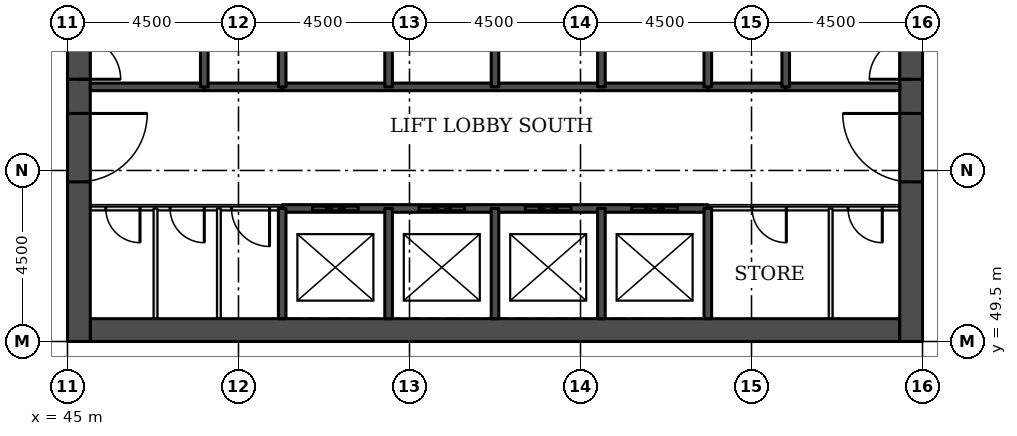
"""IFC4 building model, lengths in metres.
Left out: names, types, materials, properties, quantities, classifications, styles, units other than length and angle.
Written with IfcOpenShell. Run it as: python <this file> out.ifc"""

import sys

from ifc_helpers import new_model, si_unit, direction, frame, frame_2d, origin, place, context, subcontext, project, spatial, rectangle, extrude, element, fill, save


model = new_model("IFC4")
c1 = context("Model", 3, precision=1e-05, world=origin(), true_north=direction((0.0, 1.0)))
c2 = subcontext(c1, "Body", "Model", "MODEL_VIEW")
j1 = project(units=[si_unit("LENGTHUNIT", "METRE"), si_unit("PLANEANGLEUNIT", "RADIAN")], contexts=[c1])
p1 = place(None, origin())
s1 = spatial("IfcSite", under=j1, at=p1, CompositionType="ELEMENT")
p2 = place(p1, origin())
s2 = spatial("IfcBuilding", under=s1, at=p2, CompositionType="ELEMENT")
p3 = place(p2, frame((0.0, 0.0, 13.5)))
s3 = spatial("IfcBuildingStorey", under=s2, at=p3, CompositionType="ELEMENT", Elevation=13.5)
p4 = place(p3, frame((45.6, 49.8, 0.0), z_axis=(0.0, 0.0, 1.0), x_axis=(1.0, 0.0, 0.0)))
e1 = element("IfcWall", 1, at=p4, inside=s3, PredefinedType="SHEAR", context=c2, shape_type="SweptSolid", body=[
    extrude(rectangle(XDim=21.3, YDim=0.6, at=frame_2d((10.65, 0.0))), origin(), (0.0, 0.0, 1.0), 5.0),
])
p5 = place(p3, frame((45.3, 49.5, 0.0), z_axis=(0.0, 0.0, 1.0), x_axis=(0.0, 1.0, 0.0)))
e2 = element("IfcWall", 2, at=p5, inside=s3, PredefinedType="SHEAR", context=c2, shape_type="SweptSolid", body=[
    extrude(rectangle(XDim=22.5, YDim=0.6, at=frame_2d((11.25, 0.0))), origin(), (0.0, 0.0, 1.0), 5.0),
])
p6 = place(p5, frame((4.2, 0.0, 0.0)))
e3 = element("IfcOpeningElement", 3, at=p6, cuts=e2, PredefinedType="OPENING", context=c2, shape_type="SweptSolid", body=[
    extrude(rectangle(XDim=1.8, YDim=2.1, at=frame_2d((0.9, 1.05))), frame((0.0, 0.31, 0.0), z_axis=(0.0, -1.0, 0.0), x_axis=(1.0, 0.0, 0.0)), (0.0, 0.0, 1.0), 0.62),
])
p7 = place(p5, frame((6.9, 0.0, 0.0)))
e4 = element("IfcOpeningElement", 4, at=p7, cuts=e2, PredefinedType="OPENING", context=c2, shape_type="SweptSolid", body=[
    extrude(rectangle(XDim=1.1, YDim=2.1, at=frame_2d((0.55, 1.05))), frame((0.0, 0.31, 0.0), z_axis=(0.0, -1.0, 0.0), x_axis=(1.0, 0.0, 0.0)), (0.0, 0.0, 1.0), 0.62),
])
p8 = place(p5, frame((13.6, 0.0, 0.0)))
e5 = element("IfcOpeningElement", 5, at=p8, cuts=e2, PredefinedType="OPENING", context=c2, shape_type="SweptSolid", body=[
    extrude(rectangle(XDim=1.1, YDim=2.1, at=frame_2d((0.55, 1.05))), frame((0.0, 0.31, 0.0), z_axis=(0.0, -1.0, 0.0), x_axis=(1.0, 0.0, 0.0)), (0.0, 0.0, 1.0), 0.62),
])
p9 = place(p5, frame((16.5, 0.0, 0.0)))
e6 = element("IfcOpeningElement", 6, at=p9, cuts=e2, PredefinedType="OPENING", context=c2, shape_type="SweptSolid", body=[
    extrude(rectangle(XDim=1.8, YDim=2.1, at=frame_2d((0.9, 1.05))), frame((0.0, 0.31, 0.0), z_axis=(0.0, -1.0, 0.0), x_axis=(1.0, 0.0, 0.0)), (0.0, 0.0, 1.0), 0.62),
])
p10 = place(p3, frame((67.2, 49.5, 0.0), z_axis=(0.0, 0.0, 1.0), x_axis=(0.0, 1.0, 0.0)))
e7 = element("IfcWall", 7, at=p10, inside=s3, PredefinedType="SHEAR", context=c2, shape_type="SweptSolid", body=[
    extrude(rectangle(XDim=22.5, YDim=0.6, at=frame_2d((11.25, 0.0))), origin(), (0.0, 0.0, 1.0), 5.0),
])
p11 = place(p10, frame((4.2, 0.0, 0.0)))
e8 = element("IfcOpeningElement", 8, at=p11, cuts=e7, PredefinedType="OPENING", context=c2, shape_type="SweptSolid", body=[
    extrude(rectangle(XDim=1.8, YDim=2.1, at=frame_2d((0.9, 1.05))), frame((0.0, 0.31, 0.0), z_axis=(0.0, -1.0, 0.0), x_axis=(1.0, 0.0, 0.0)), (0.0, 0.0, 1.0), 0.62),
])
p12 = place(p10, frame((6.9, 0.0, 0.0)))
e9 = element("IfcOpeningElement", 9, at=p12, cuts=e7, PredefinedType="OPENING", context=c2, shape_type="SweptSolid", body=[
    extrude(rectangle(XDim=1.1, YDim=2.1, at=frame_2d((0.55, 1.05))), frame((0.0, 0.31, 0.0), z_axis=(0.0, -1.0, 0.0), x_axis=(1.0, 0.0, 0.0)), (0.0, 0.0, 1.0), 0.62),
])
p13 = place(p10, frame((13.6, 0.0, 0.0)))
e10 = element("IfcOpeningElement", 10, at=p13, cuts=e7, PredefinedType="OPENING", context=c2, shape_type="SweptSolid", body=[
    extrude(rectangle(XDim=1.1, YDim=2.1, at=frame_2d((0.55, 1.05))), frame((0.0, 0.31, 0.0), z_axis=(0.0, -1.0, 0.0), x_axis=(1.0, 0.0, 0.0)), (0.0, 0.0, 1.0), 0.62),
])
p14 = place(p10, frame((16.5, 0.0, 0.0)))
e11 = element("IfcOpeningElement", 11, at=p14, cuts=e7, PredefinedType="OPENING", context=c2, shape_type="SweptSolid", body=[
    extrude(rectangle(XDim=1.8, YDim=2.1, at=frame_2d((0.9, 1.05))), frame((0.0, 0.31, 0.0), z_axis=(0.0, -1.0, 0.0), x_axis=(1.0, 0.0, 0.0)), (0.0, 0.0, 1.0), 0.62),
])
p15 = place(p3, frame((45.6, 53.0, 0.0), z_axis=(0.0, 0.0, 1.0), x_axis=(1.0, 0.0, 0.0)))
e12 = element("IfcWall", 12, at=p15, inside=s3, PredefinedType="PARTITIONING", context=c2, shape_type="SweptSolid", body=[
    extrude(rectangle(XDim=5.05, YDim=0.1, at=frame_2d((2.525, 0.0))), origin(), (0.0, 0.0, 1.0), 4.78),
])
p16 = place(p15, frame((0.408, 0.0, 0.0)))
e13 = element("IfcOpeningElement", 13, at=p16, cuts=e12, PredefinedType="OPENING", context=c2, shape_type="SweptSolid", body=[
    extrude(rectangle(XDim=0.9, YDim=2.1, at=frame_2d((0.45, 1.05))), frame((0.0, 0.06, 0.0), z_axis=(0.0, -1.0, 0.0), x_axis=(1.0, 0.0, 0.0)), (0.0, 0.0, 1.0), 0.12),
])
p17 = place(p15, frame((2.1, 0.0, 0.0)))
e14 = element("IfcOpeningElement", 14, at=p17, cuts=e12, PredefinedType="OPENING", context=c2, shape_type="SweptSolid", body=[
    extrude(rectangle(XDim=0.9, YDim=2.1, at=frame_2d((0.45, 1.05))), frame((0.0, 0.06, 0.0), z_axis=(0.0, -1.0, 0.0), x_axis=(1.0, 0.0, 0.0)), (0.0, 0.0, 1.0), 0.12),
])
p18 = place(p15, frame((3.717, 0.0, 0.0)))
e15 = element("IfcOpeningElement", 15, at=p18, cuts=e12, PredefinedType="OPENING", context=c2, shape_type="SweptSolid", body=[
    extrude(rectangle(XDim=1.0, YDim=2.1, at=frame_2d((0.5, 1.05))), frame((0.0, 0.06, 0.0), z_axis=(0.0, -1.0, 0.0), x_axis=(1.0, 0.0, 0.0)), (0.0, 0.0, 1.0), 0.12),
])
p19 = place(p3, frame((61.85, 53.0, 0.0), z_axis=(0.0, 0.0, 1.0), x_axis=(1.0, 0.0, 0.0)))
e16 = element("IfcWall", 16, at=p19, inside=s3, PredefinedType="PARTITIONING", context=c2, shape_type="SweptSolid", body=[
    extrude(rectangle(XDim=5.05, YDim=0.1, at=frame_2d((2.525, 0.0))), origin(), (0.0, 0.0, 1.0), 4.78),
])
p20 = place(p19, frame((3.691, 0.0, 0.0)))
e17 = element("IfcOpeningElement", 17, at=p20, cuts=e16, PredefinedType="OPENING", context=c2, shape_type="SweptSolid", body=[
    extrude(rectangle(XDim=0.9, YDim=2.1, at=frame_2d((0.45, 1.05))), frame((0.0, 0.06, 0.0), z_axis=(0.0, -1.0, 0.0), x_axis=(1.0, 0.0, 0.0)), (0.0, 0.0, 1.0), 0.12),
])
p21 = place(p19, frame((1.166, 0.0, 0.0)))
e18 = element("IfcOpeningElement", 18, at=p21, cuts=e16, PredefinedType="OPENING", context=c2, shape_type="SweptSolid", body=[
    extrude(rectangle(XDim=0.9, YDim=2.1, at=frame_2d((0.45, 1.05))), frame((0.0, 0.06, 0.0), z_axis=(0.0, -1.0, 0.0), x_axis=(1.0, 0.0, 0.0)), (0.0, 0.0, 1.0), 0.12),
])
p22 = place(p3, frame((50.65, 53.0, 0.0), z_axis=(0.0, 0.0, 1.0), x_axis=(1.0, 0.0, 0.0)))
e19 = element("IfcWall", 19, at=p22, inside=s3, PredefinedType="SOLIDWALL", context=c2, shape_type="SweptSolid", body=[
    extrude(rectangle(XDim=11.2, YDim=0.2, at=frame_2d((5.6, 0.0))), origin(), (0.0, 0.0, 1.0), 4.78),
])
p23 = place(p22, frame((0.8, 0.0, 0.0)))
e20 = element("IfcOpeningElement", 20, at=p23, cuts=e19, PredefinedType="OPENING", context=c2, shape_type="SweptSolid", body=[
    extrude(rectangle(XDim=1.2, YDim=2.1, at=frame_2d((0.6, 1.05))), frame((0.0, 0.11, 0.0), z_axis=(0.0, -1.0, 0.0), x_axis=(1.0, 0.0, 0.0)), (0.0, 0.0, 1.0), 0.22),
])
p24 = place(p22, frame((3.6, 0.0, 0.0)))
e21 = element("IfcOpeningElement", 21, at=p24, cuts=e19, PredefinedType="OPENING", context=c2, shape_type="SweptSolid", body=[
    extrude(rectangle(XDim=1.2, YDim=2.1, at=frame_2d((0.6, 1.05))), frame((0.0, 0.11, 0.0), z_axis=(0.0, -1.0, 0.0), x_axis=(1.0, 0.0, 0.0)), (0.0, 0.0, 1.0), 0.22),
])
p25 = place(p22, frame((6.4, 0.0, 0.0)))
e22 = element("IfcOpeningElement", 22, at=p25, cuts=e19, PredefinedType="OPENING", context=c2, shape_type="SweptSolid", body=[
    extrude(rectangle(XDim=1.2, YDim=2.1, at=frame_2d((0.6, 1.05))), frame((0.0, 0.11, 0.0), z_axis=(0.0, -1.0, 0.0), x_axis=(1.0, 0.0, 0.0)), (0.0, 0.0, 1.0), 0.22),
])
p26 = place(p22, frame((9.2, 0.0, 0.0)))
e23 = element("IfcOpeningElement", 23, at=p26, cuts=e19, PredefinedType="OPENING", context=c2, shape_type="SweptSolid", body=[
    extrude(rectangle(XDim=1.2, YDim=2.1, at=frame_2d((0.6, 1.05))), frame((0.0, 0.11, 0.0), z_axis=(0.0, -1.0, 0.0), x_axis=(1.0, 0.0, 0.0)), (0.0, 0.0, 1.0), 0.22),
])
for number, where, z_axis, x_axis in (
    (24, (48.6, 56.2, 0.0), (0.0, 0.0, 1.0), (1.0, 0.0, 0.0)),
    (25, (61.85, 56.2, 0.0), (0.0, 0.0, 1.0), (1.0, 0.0, 0.0)),
):
    element("IfcWall", number, at=place(p3, frame(where, z_axis=z_axis, x_axis=x_axis)), inside=s3, PredefinedType="SOLIDWALL", context=c2, shape_type="SweptSolid", body=[
        extrude(rectangle(XDim=2.05, YDim=0.2, at=frame_2d((1.025, 0.0))), origin(), (0.0, 0.0, 1.0), 4.78),
    ])
p27 = place(p3, frame((45.6, 56.2, 0.0), z_axis=(0.0, 0.0, 1.0), x_axis=(1.0, 0.0, 0.0)))
e26 = element("IfcWall", 26, at=p27, inside=s3, PredefinedType="SOLIDWALL", context=c2, shape_type="SweptSolid", body=[
    extrude(rectangle(XDim=3.0, YDim=0.2, at=frame_2d((1.5, 0.0))), origin(), (0.0, 0.0, 1.0), 4.78),
])
p28 = place(p3, frame((50.65, 56.2, 0.0), z_axis=(0.0, 0.0, 1.0), x_axis=(1.0, 0.0, 0.0)))
e27 = element("IfcWall", 27, at=p28, inside=s3, PredefinedType="SOLIDWALL", context=c2, shape_type="SweptSolid", body=[
    extrude(rectangle(XDim=11.2, YDim=0.2, at=frame_2d((5.6, 0.0))), origin(), (0.0, 0.0, 1.0), 4.78),
])
p29 = place(p3, frame((63.9, 56.2, 0.0), z_axis=(0.0, 0.0, 1.0), x_axis=(1.0, 0.0, 0.0)))
e28 = element("IfcWall", 28, at=p29, inside=s3, PredefinedType="SOLIDWALL", context=c2, shape_type="SweptSolid", body=[
    extrude(rectangle(XDim=3.0, YDim=0.2, at=frame_2d((1.5, 0.0))), origin(), (0.0, 0.0, 1.0), 4.78),
])
p30 = place(p3, frame((47.317, 50.1, 0.0), z_axis=(0.0, 0.0, 1.0), x_axis=(0.0, 1.0, 0.0)))
e29 = element("IfcWall", 29, at=p30, inside=s3, PredefinedType="PARTITIONING", context=c2, shape_type="SweptSolid", body=[
    extrude(rectangle(XDim=2.9, YDim=0.1, at=frame_2d((1.45, 0.0))), origin(), (0.0, 0.0, 1.0), 4.78),
])
p31 = place(p3, frame((48.6, 56.2, 0.0), z_axis=(0.0, 0.0, 1.0), x_axis=(0.0, 1.0, 0.0)))
e30 = element("IfcWall", 30, at=p31, inside=s3, PredefinedType="SOLIDWALL", context=c2, shape_type="SweptSolid", body=[
    extrude(rectangle(XDim=5.8, YDim=0.2, at=frame_2d((2.9, 0.0))), origin(), (0.0, 0.0, 1.0), 4.78),
])
p32 = place(p3, frame((48.983, 50.1, 0.0), z_axis=(0.0, 0.0, 1.0), x_axis=(0.0, 1.0, 0.0)))
e31 = element("IfcWall", 31, at=p32, inside=s3, PredefinedType="PARTITIONING", context=c2, shape_type="SweptSolid", body=[
    extrude(rectangle(XDim=2.9, YDim=0.1, at=frame_2d((1.45, 0.0))), origin(), (0.0, 0.0, 1.0), 4.78),
])
p33 = place(p3, frame((50.65, 50.1, 0.0), z_axis=(0.0, 0.0, 1.0), x_axis=(0.0, 1.0, 0.0)))
e32 = element("IfcWall", 32, at=p33, inside=s3, PredefinedType="SOLIDWALL", context=c2, shape_type="SweptSolid", body=[
    extrude(rectangle(XDim=2.9, YDim=0.2, at=frame_2d((1.45, 0.0))), origin(), (0.0, 0.0, 1.0), 4.78),
])
p34 = place(p3, frame((50.65, 56.2, 0.0), z_axis=(0.0, 0.0, 1.0), x_axis=(0.0, 1.0, 0.0)))
e33 = element("IfcWall", 33, at=p34, inside=s3, PredefinedType="SOLIDWALL", context=c2, shape_type="SweptSolid", body=[
    extrude(rectangle(XDim=2.8, YDim=0.2, at=frame_2d((1.4, 0.0))), origin(), (0.0, 0.0, 1.0), 4.78),
])
p35 = place(p3, frame((53.45, 50.1, 0.0), z_axis=(0.0, 0.0, 1.0), x_axis=(0.0, 1.0, 0.0)))
e34 = element("IfcWall", 34, at=p35, inside=s3, PredefinedType="SOLIDWALL", context=c2, shape_type="SweptSolid", body=[
    extrude(rectangle(XDim=2.9, YDim=0.2, at=frame_2d((1.45, 0.0))), origin(), (0.0, 0.0, 1.0), 4.78),
])
p36 = place(p3, frame((53.45, 56.2, 0.0), z_axis=(0.0, 0.0, 1.0), x_axis=(0.0, 1.0, 0.0)))
e35 = element("IfcWall", 35, at=p36, inside=s3, PredefinedType="SOLIDWALL", context=c2, shape_type="SweptSolid", body=[
    extrude(rectangle(XDim=2.8, YDim=0.2, at=frame_2d((1.4, 0.0))), origin(), (0.0, 0.0, 1.0), 4.78),
])
p37 = place(p3, frame((56.25, 50.1, 0.0), z_axis=(0.0, 0.0, 1.0), x_axis=(0.0, 1.0, 0.0)))
e36 = element("IfcWall", 36, at=p37, inside=s3, PredefinedType="SOLIDWALL", context=c2, shape_type="SweptSolid", body=[
    extrude(rectangle(XDim=2.9, YDim=0.2, at=frame_2d((1.45, 0.0))), origin(), (0.0, 0.0, 1.0), 4.78),
])
p38 = place(p3, frame((56.25, 56.2, 0.0), z_axis=(0.0, 0.0, 1.0), x_axis=(0.0, 1.0, 0.0)))
e37 = element("IfcWall", 37, at=p38, inside=s3, PredefinedType="SOLIDWALL", context=c2, shape_type="SweptSolid", body=[
    extrude(rectangle(XDim=2.8, YDim=0.2, at=frame_2d((1.4, 0.0))), origin(), (0.0, 0.0, 1.0), 4.78),
])
p39 = place(p3, frame((59.05, 50.1, 0.0), z_axis=(0.0, 0.0, 1.0), x_axis=(0.0, 1.0, 0.0)))
e38 = element("IfcWall", 38, at=p39, inside=s3, PredefinedType="SOLIDWALL", context=c2, shape_type="SweptSolid", body=[
    extrude(rectangle(XDim=2.9, YDim=0.2, at=frame_2d((1.45, 0.0))), origin(), (0.0, 0.0, 1.0), 4.78),
])
p40 = place(p3, frame((59.05, 56.2, 0.0), z_axis=(0.0, 0.0, 1.0), x_axis=(0.0, 1.0, 0.0)))
e39 = element("IfcWall", 39, at=p40, inside=s3, PredefinedType="SOLIDWALL", context=c2, shape_type="SweptSolid", body=[
    extrude(rectangle(XDim=2.8, YDim=0.2, at=frame_2d((1.4, 0.0))), origin(), (0.0, 0.0, 1.0), 4.78),
])
p41 = place(p3, frame((61.85, 50.1, 0.0), z_axis=(0.0, 0.0, 1.0), x_axis=(0.0, 1.0, 0.0)))
e40 = element("IfcWall", 40, at=p41, inside=s3, PredefinedType="SOLIDWALL", context=c2, shape_type="SweptSolid", body=[
    extrude(rectangle(XDim=2.9, YDim=0.2, at=frame_2d((1.45, 0.0))), origin(), (0.0, 0.0, 1.0), 4.78),
])
p42 = place(p3, frame((61.85, 56.2, 0.0), z_axis=(0.0, 0.0, 1.0), x_axis=(0.0, 1.0, 0.0)))
e41 = element("IfcWall", 41, at=p42, inside=s3, PredefinedType="SOLIDWALL", context=c2, shape_type="SweptSolid", body=[
    extrude(rectangle(XDim=2.8, YDim=0.2, at=frame_2d((1.4, 0.0))), origin(), (0.0, 0.0, 1.0), 4.78),
])
p43 = place(p3, frame((63.9, 56.2, 0.0), z_axis=(0.0, 0.0, 1.0), x_axis=(0.0, 1.0, 0.0)))
e42 = element("IfcWall", 42, at=p43, inside=s3, PredefinedType="SOLIDWALL", context=c2, shape_type="SweptSolid", body=[
    extrude(rectangle(XDim=5.8, YDim=0.2, at=frame_2d((2.9, 0.0))), origin(), (0.0, 0.0, 1.0), 4.78),
])
p44 = place(p3, frame((65.082, 50.1, 0.0), z_axis=(0.0, 0.0, 1.0), x_axis=(0.0, 1.0, 0.0)))
e43 = element("IfcWall", 43, at=p44, inside=s3, PredefinedType="PARTITIONING", context=c2, shape_type="SweptSolid", body=[
    extrude(rectangle(XDim=2.9, YDim=0.1, at=frame_2d((1.45, 0.0))), origin(), (0.0, 0.0, 1.0), 4.78),
])
p45 = place(p23, origin())
e44 = element("IfcDoor", 44, at=p45, inside=s3, OperationType="DOUBLE_DOOR_SLIDING", PredefinedType="DOOR", context=c2, shape_type="SweptSolid", body=[
    extrude(rectangle(XDim=1.2, YDim=2.1, at=frame_2d((0.6, 1.05))), frame((0.0, 0.025, 0.0), z_axis=(0.0, -1.0, 0.0), x_axis=(1.0, 0.0, 0.0)), (0.0, 0.0, 1.0), 0.05),
])
fill(e20, e44)
p46 = place(p24, origin())
e45 = element("IfcDoor", 45, at=p46, inside=s3, OperationType="DOUBLE_DOOR_SLIDING", PredefinedType="DOOR", context=c2, shape_type="SweptSolid", body=[
    extrude(rectangle(XDim=1.2, YDim=2.1, at=frame_2d((0.6, 1.05))), frame((0.0, 0.025, 0.0), z_axis=(0.0, -1.0, 0.0), x_axis=(1.0, 0.0, 0.0)), (0.0, 0.0, 1.0), 0.05),
])
fill(e21, e45)
p47 = place(p25, origin())
e46 = element("IfcDoor", 46, at=p47, inside=s3, OperationType="DOUBLE_DOOR_SLIDING", PredefinedType="DOOR", context=c2, shape_type="SweptSolid", body=[
    extrude(rectangle(XDim=1.2, YDim=2.1, at=frame_2d((0.6, 1.05))), frame((0.0, 0.025, 0.0), z_axis=(0.0, -1.0, 0.0), x_axis=(1.0, 0.0, 0.0)), (0.0, 0.0, 1.0), 0.05),
])
fill(e22, e46)
p48 = place(p26, origin())
e47 = element("IfcDoor", 47, at=p48, inside=s3, OperationType="DOUBLE_DOOR_SLIDING", PredefinedType="DOOR", context=c2, shape_type="SweptSolid", body=[
    extrude(rectangle(XDim=1.2, YDim=2.1, at=frame_2d((0.6, 1.05))), frame((0.0, 0.025, 0.0), z_axis=(0.0, -1.0, 0.0), x_axis=(1.0, 0.0, 0.0)), (0.0, 0.0, 1.0), 0.05),
])
fill(e23, e47)
p49 = place(p6, frame((1.8, 0.0, 0.0), z_axis=(0.0, 0.0, 1.0), x_axis=(-1.0, 0.0, 0.0)))
e48 = element("IfcDoor", 48, at=p49, inside=s3, OperationType="SINGLE_SWING_LEFT", PredefinedType="DOOR", context=c2, shape_type="SweptSolid", body=[
    extrude(rectangle(XDim=1.8, YDim=2.1, at=frame_2d((0.9, 1.05))), frame((0.0, 0.025, 0.0), z_axis=(0.0, -1.0, 0.0), x_axis=(1.0, 0.0, 0.0)), (0.0, 0.0, 1.0), 0.05),
])
fill(e3, e48)
p50 = place(p7, frame((1.1, 0.0, 0.0), z_axis=(0.0, 0.0, 1.0), x_axis=(-1.0, 0.0, 0.0)))
e49 = element("IfcDoor", 49, at=p50, inside=s3, OperationType="SINGLE_SWING_RIGHT", PredefinedType="DOOR", context=c2, shape_type="SweptSolid", body=[
    extrude(rectangle(XDim=1.1, YDim=2.1, at=frame_2d((0.55, 1.05))), frame((0.0, 0.025, 0.0), z_axis=(0.0, -1.0, 0.0), x_axis=(1.0, 0.0, 0.0)), (0.0, 0.0, 1.0), 0.05),
])
fill(e4, e49)
p51 = place(p11, origin())
e50 = element("IfcDoor", 50, at=p51, inside=s3, OperationType="SINGLE_SWING_RIGHT", PredefinedType="DOOR", context=c2, shape_type="SweptSolid", body=[
    extrude(rectangle(XDim=1.8, YDim=2.1, at=frame_2d((0.9, 1.05))), frame((0.0, 0.025, 0.0), z_axis=(0.0, -1.0, 0.0), x_axis=(1.0, 0.0, 0.0)), (0.0, 0.0, 1.0), 0.05),
])
fill(e8, e50)
p52 = place(p12, origin())
e51 = element("IfcDoor", 51, at=p52, inside=s3, OperationType="SINGLE_SWING_LEFT", PredefinedType="DOOR", context=c2, shape_type="SweptSolid", body=[
    extrude(rectangle(XDim=1.1, YDim=2.1, at=frame_2d((0.55, 1.05))), frame((0.0, 0.025, 0.0), z_axis=(0.0, -1.0, 0.0), x_axis=(1.0, 0.0, 0.0)), (0.0, 0.0, 1.0), 0.05),
])
fill(e9, e51)
p53 = place(p20, frame((0.9, 0.0, 0.0), z_axis=(0.0, 0.0, 1.0), x_axis=(-1.0, 0.0, 0.0)))
e52 = element("IfcDoor", 52, at=p53, inside=s3, OperationType="SINGLE_SWING_LEFT", PredefinedType="DOOR", context=c2, shape_type="SweptSolid", body=[
    extrude(rectangle(XDim=0.9, YDim=2.1, at=frame_2d((0.45, 1.05))), frame((0.0, 0.025, 0.0), z_axis=(0.0, -1.0, 0.0), x_axis=(1.0, 0.0, 0.0)), (0.0, 0.0, 1.0), 0.05),
])
fill(e17, e52)
p54 = place(p21, frame((0.9, 0.0, 0.0), z_axis=(0.0, 0.0, 1.0), x_axis=(-1.0, 0.0, 0.0)))
e53 = element("IfcDoor", 53, at=p54, inside=s3, OperationType="SINGLE_SWING_LEFT", PredefinedType="DOOR", context=c2, shape_type="SweptSolid", body=[
    extrude(rectangle(XDim=0.9, YDim=2.1, at=frame_2d((0.45, 1.05))), frame((0.0, 0.025, 0.0), z_axis=(0.0, -1.0, 0.0), x_axis=(1.0, 0.0, 0.0)), (0.0, 0.0, 1.0), 0.05),
])
fill(e18, e53)
p55 = place(p16, frame((0.9, 0.0, 0.0), z_axis=(0.0, 0.0, 1.0), x_axis=(-1.0, 0.0, 0.0)))
e54 = element("IfcDoor", 54, at=p55, inside=s3, OperationType="SINGLE_SWING_LEFT", PredefinedType="DOOR", context=c2, shape_type="SweptSolid", body=[
    extrude(rectangle(XDim=0.9, YDim=2.1, at=frame_2d((0.45, 1.05))), frame((0.0, 0.025, 0.0), z_axis=(0.0, -1.0, 0.0), x_axis=(1.0, 0.0, 0.0)), (0.0, 0.0, 1.0), 0.05),
])
fill(e13, e54)
p56 = place(p17, frame((0.9, 0.0, 0.0), z_axis=(0.0, 0.0, 1.0), x_axis=(-1.0, 0.0, 0.0)))
e55 = element("IfcDoor", 55, at=p56, inside=s3, OperationType="SINGLE_SWING_LEFT", PredefinedType="DOOR", context=c2, shape_type="SweptSolid", body=[
    extrude(rectangle(XDim=0.9, YDim=2.1, at=frame_2d((0.45, 1.05))), frame((0.0, 0.025, 0.0), z_axis=(0.0, -1.0, 0.0), x_axis=(1.0, 0.0, 0.0)), (0.0, 0.0, 1.0), 0.05),
])
fill(e14, e55)
p57 = place(p18, frame((1.0, 0.0, 0.0), z_axis=(0.0, 0.0, 1.0), x_axis=(-1.0, 0.0, 0.0)))
e56 = element("IfcDoor", 56, at=p57, inside=s3, OperationType="SINGLE_SWING_LEFT", PredefinedType="DOOR", context=c2, shape_type="SweptSolid", body=[
    extrude(rectangle(XDim=1.0, YDim=2.1, at=frame_2d((0.5, 1.05))), frame((0.0, 0.025, 0.0), z_axis=(0.0, -1.0, 0.0), x_axis=(1.0, 0.0, 0.0)), (0.0, 0.0, 1.0), 0.05),
])
fill(e15, e56)
save(model, sys.argv[1])
